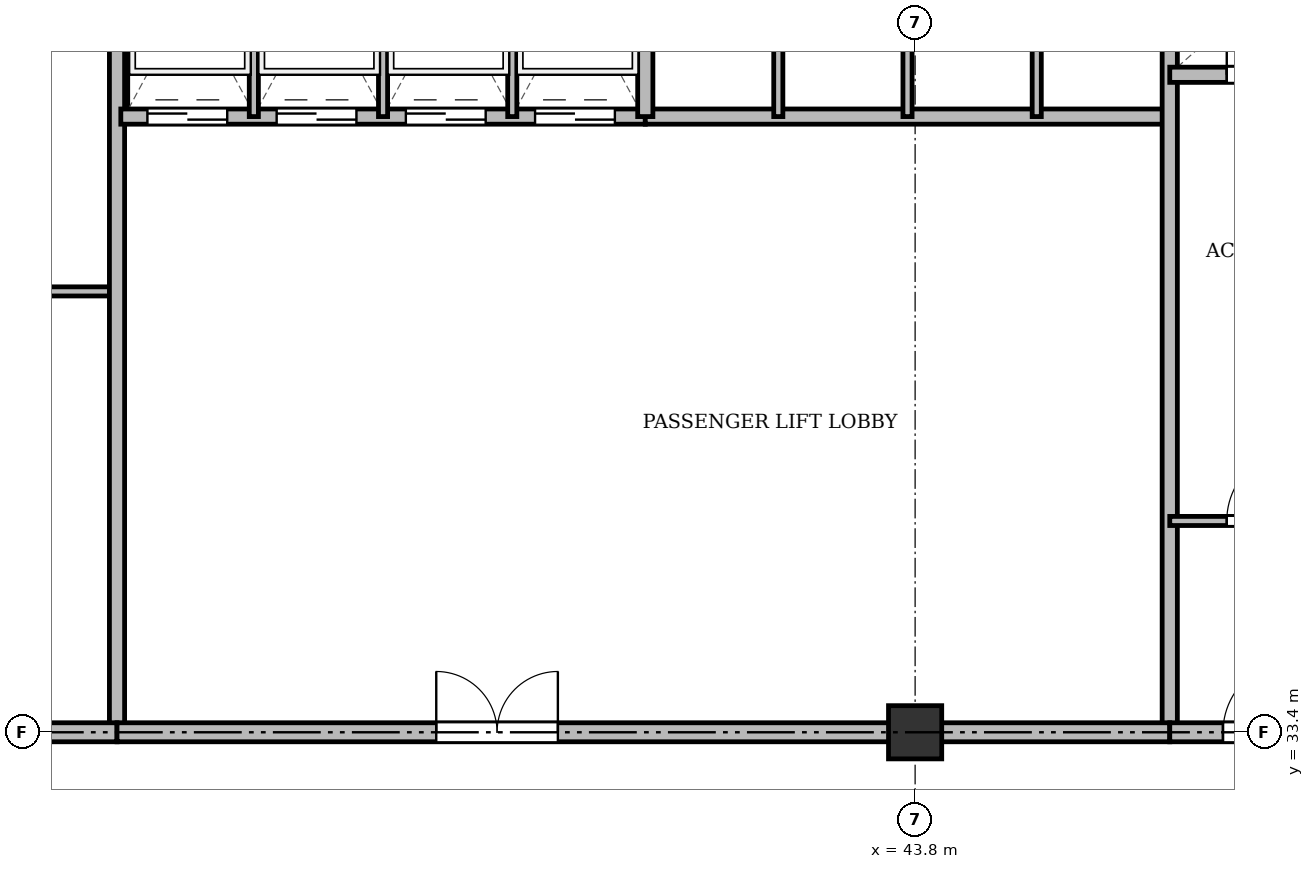
"""IFC4 building model, lengths in metres.
Left out: names, types, materials, properties, quantities, classifications, styles, units other than length and angle.
Written with IfcOpenShell. Run it as: python <this file> out.ifc"""

import sys

from ifc_helpers import new_model, si_unit, direction, frame, frame_2d, origin, origin_2d, place, context, subcontext, project, spatial, rectangle, extrude, source, transform, mapped, element, fill, save


model = new_model("IFC4")
c1 = context("Model", 3, precision=1e-05, world=origin(), true_north=direction((0.0, 1.0)))
c2 = subcontext(c1, "Body", "Model", "MODEL_VIEW")
j1 = project(units=[si_unit("LENGTHUNIT", "METRE"), si_unit("PLANEANGLEUNIT", "RADIAN")], contexts=[c1])
p1 = place(None, origin())
s1 = spatial("IfcSite", under=j1, at=p1, CompositionType="ELEMENT")
p2 = place(p1, origin())
s2 = spatial("IfcBuilding", under=s1, at=p2, CompositionType="ELEMENT")
p3 = place(p2, frame((0.0, 0.0, 171.7)))
s3 = spatial("IfcBuildingStorey", under=s2, at=p3, CompositionType="ELEMENT", Elevation=171.7)
m1 = source(origin(), c2, "Body", "SweptSolid", [
    extrude(rectangle(XDim=0.7, YDim=0.7, at=origin_2d()), origin(), (0.0, 0.0, 1.0), 3.6),
])
p4 = place(p3, frame((43.8, 33.4, 0.0), z_axis=(0.0, 0.0, 1.0), x_axis=(1.0, 0.0, 0.0)))
e1 = element("IfcColumn", 1, at=p4, inside=s3, PredefinedType="COLUMN", context=c2, shape_type="MappedRepresentation", body=[
    mapped(m1, transform((0.0, 0.0, 0.0), x_axis=(1.0, 0.0, 0.0), y_axis=(0.0, 1.0, 0.0), z_axis=(0.0, 0.0, 1.0), scale=1.0)),
])
p5 = place(p3, frame((26.3, 39.2, 0.0), z_axis=(0.0, 0.0, 1.0), x_axis=(1.0, 0.0, 0.0)))
e2 = element("IfcWall", 2, at=p5, inside=s3, PredefinedType="PARTITIONING", context=c2, shape_type="SweptSolid", body=[
    extrude(rectangle(XDim=7.0, YDim=0.12, at=frame_2d((3.5, 0.0))), origin(), (0.0, 0.0, 1.0), 2.85),
])
p6 = place(p5, frame((2.6, 0.0, 0.0)))
e3 = element("IfcOpeningElement", 3, at=p6, cuts=e2, PredefinedType="OPENING", context=c2, shape_type="SweptSolid", body=[
    extrude(rectangle(XDim=0.95, YDim=2.15, at=frame_2d((0.475, 1.075))), frame((0.0, 0.07, 0.0), z_axis=(0.0, -1.0, 0.0), x_axis=(1.0, 0.0, 0.0)), (0.0, 0.0, 1.0), 0.14),
])
p7 = place(p3, frame((33.3, 33.4, 0.0), z_axis=(0.0, 0.0, 1.0), x_axis=(0.0, 1.0, 0.0)))
e4 = element("IfcWall", 4, at=p7, inside=s3, PredefinedType="SOLIDWALL", context=c2, shape_type="SweptSolid", body=[
    extrude(rectangle(XDim=11.3, YDim=0.2, at=frame_2d((5.65, 0.0))), origin(), (0.0, 0.0, 1.0), 2.75),
])
p8 = place(p3, frame((33.35, 41.5, 0.0), z_axis=(0.0, 0.0, 1.0), x_axis=(1.0, 0.0, 0.0)))
e5 = element("IfcWall", 5, at=p8, inside=s3, PredefinedType="SOLIDWALL", context=c2, shape_type="SweptSolid", body=[
    extrude(rectangle(XDim=6.9, YDim=0.2, at=frame_2d((3.45, 0.0))), origin(), (0.0, 0.0, 1.0), 3.35),
])
p9 = place(p8, frame((0.35, 0.0, 0.0)))
e6 = element("IfcOpeningElement", 6, at=p9, cuts=e5, PredefinedType="OPENING", context=c2, shape_type="SweptSolid", body=[
    extrude(rectangle(XDim=1.05, YDim=2.15, at=frame_2d((0.525, 1.075))), frame((0.0, 0.11, 0.0), z_axis=(0.0, -1.0, 0.0), x_axis=(1.0, 0.0, 0.0)), (0.0, 0.0, 1.0), 0.22),
])
p10 = place(p8, frame((2.05, 0.0, 0.0)))
e7 = element("IfcOpeningElement", 7, at=p10, cuts=e5, PredefinedType="OPENING", context=c2, shape_type="SweptSolid", body=[
    extrude(rectangle(XDim=1.05, YDim=2.15, at=frame_2d((0.525, 1.075))), frame((0.0, 0.11, 0.0), z_axis=(0.0, -1.0, 0.0), x_axis=(1.0, 0.0, 0.0)), (0.0, 0.0, 1.0), 0.22),
])
p11 = place(p8, frame((3.75, 0.0, 0.0)))
e8 = element("IfcOpeningElement", 8, at=p11, cuts=e5, PredefinedType="OPENING", context=c2, shape_type="SweptSolid", body=[
    extrude(rectangle(XDim=1.05, YDim=2.15, at=frame_2d((0.525, 1.075))), frame((0.0, 0.11, 0.0), z_axis=(0.0, -1.0, 0.0), x_axis=(1.0, 0.0, 0.0)), (0.0, 0.0, 1.0), 0.22),
])
p12 = place(p8, frame((5.45, 0.0, 0.0)))
e9 = element("IfcOpeningElement", 9, at=p12, cuts=e5, PredefinedType="OPENING", context=c2, shape_type="SweptSolid", body=[
    extrude(rectangle(XDim=1.05, YDim=2.15, at=frame_2d((0.525, 1.075))), frame((0.0, 0.11, 0.0), z_axis=(0.0, -1.0, 0.0), x_axis=(1.0, 0.0, 0.0)), (0.0, 0.0, 1.0), 0.22),
])
for number, where, z_axis, x_axis in (
    (10, (35.1, 41.5, 0.0), (0.0, 0.0, 1.0), (0.0, 1.0, 0.0)),
    (11, (36.8, 41.5, 0.0), (0.0, 0.0, 1.0), (0.0, 1.0, 0.0)),
    (12, (38.5, 41.5, 0.0), (0.0, 0.0, 1.0), (0.0, 1.0, 0.0)),
):
    element("IfcWall", number, at=place(p3, frame(where, z_axis=z_axis, x_axis=x_axis)), inside=s3, PredefinedType="PARTITIONING", context=c2, shape_type="SweptSolid", body=[
        extrude(rectangle(XDim=3.2, YDim=0.12, at=frame_2d((1.6, 0.0))), origin(), (0.0, 0.0, 1.0), 3.35),
    ])
p13 = place(p3, frame((40.25, 41.5, 0.0), z_axis=(0.0, 0.0, 1.0), x_axis=(1.0, 0.0, 0.0)))
e13 = element("IfcWall", 13, at=p13, inside=s3, PredefinedType="SOLIDWALL", context=c2, shape_type="SweptSolid", body=[
    extrude(rectangle(XDim=6.9, YDim=0.2, at=frame_2d((3.45, 0.0))), origin(), (0.0, 0.0, 1.0), 2.85),
])
p14 = place(p3, frame((40.25, 41.5, 0.0), z_axis=(0.0, 0.0, 1.0), x_axis=(0.0, 1.0, 0.0)))
e14 = element("IfcWall", 14, at=p14, inside=s3, PredefinedType="SOLIDWALL", context=c2, shape_type="SweptSolid", body=[
    extrude(rectangle(XDim=3.2, YDim=0.2, at=frame_2d((1.6, 0.0))), origin(), (0.0, 0.0, 1.0), 3.35),
])
p15 = place(p3, frame((42.0, 41.5, 0.0), z_axis=(0.0, 0.0, 1.0), x_axis=(0.0, 1.0, 0.0)))
e15 = element("IfcWall", 15, at=p15, inside=s3, PredefinedType="PARTITIONING", context=c2, shape_type="SweptSolid", body=[
    extrude(rectangle(XDim=3.2, YDim=0.12, at=frame_2d((1.6, 0.0))), origin(), (0.0, 0.0, 1.0), 3.35),
])
p16 = place(p3, frame((43.7, 41.5, 0.0), z_axis=(0.0, 0.0, 1.0), x_axis=(0.0, 1.0, 0.0)))
e16 = element("IfcWall", 16, at=p16, inside=s3, PredefinedType="PARTITIONING", context=c2, shape_type="SweptSolid", body=[
    extrude(rectangle(XDim=3.2, YDim=0.12, at=frame_2d((1.6, 0.0))), origin(), (0.0, 0.0, 1.0), 2.85),
])
p17 = place(p3, frame((45.4, 41.5, 0.0), z_axis=(0.0, 0.0, 1.0), x_axis=(0.0, 1.0, 0.0)))
e17 = element("IfcWall", 17, at=p17, inside=s3, PredefinedType="PARTITIONING", context=c2, shape_type="SweptSolid", body=[
    extrude(rectangle(XDim=3.2, YDim=0.12, at=frame_2d((1.6, 0.0))), origin(), (0.0, 0.0, 1.0), 3.35),
])
p18 = place(p3, frame((47.15, 33.4, 0.0), z_axis=(0.0, 0.0, 1.0), x_axis=(0.0, 1.0, 0.0)))
e18 = element("IfcWall", 18, at=p18, inside=s3, PredefinedType="SOLIDWALL", context=c2, shape_type="SweptSolid", body=[
    extrude(rectangle(XDim=11.3, YDim=0.2, at=frame_2d((5.65, 0.0))), origin(), (0.0, 0.0, 1.0), 2.75),
])
p19 = place(p3, frame((26.3, 33.4, 0.0), z_axis=(0.0, 0.0, 1.0), x_axis=(1.0, 0.0, 0.0)))
e19 = element("IfcWall", 19, at=p19, inside=s3, PredefinedType="PARTITIONING", context=c2, shape_type="SweptSolid", body=[
    extrude(rectangle(XDim=7.0, YDim=0.25, at=frame_2d((3.5, 0.0))), origin(), (0.0, 0.0, 1.0), 2.75),
])
p20 = place(p19, frame((1.35, 0.0, 0.0)))
e20 = element("IfcOpeningElement", 20, at=p20, cuts=e19, PredefinedType="OPENING", context=c2, shape_type="SweptSolid", body=[
    extrude(rectangle(XDim=0.95, YDim=2.15, at=frame_2d((0.475, 1.075))), frame((0.0, 0.135, 0.0), z_axis=(0.0, -1.0, 0.0), x_axis=(1.0, 0.0, 0.0)), (0.0, 0.0, 1.0), 0.27),
])
p21 = place(p3, frame((33.3, 33.4, 0.0), z_axis=(0.0, 0.0, 1.0), x_axis=(1.0, 0.0, 0.0)))
e21 = element("IfcWall", 21, at=p21, inside=s3, PredefinedType="PARTITIONING", context=c2, shape_type="SweptSolid", body=[
    extrude(rectangle(XDim=13.85, YDim=0.25, at=frame_2d((6.925, 0.0))), origin(), (0.0, 0.0, 1.0), 2.75),
])
p22 = place(p21, frame((4.2, 0.0, 0.0)))
e22 = element("IfcOpeningElement", 22, at=p22, cuts=e21, PredefinedType="OPENING", context=c2, shape_type="SweptSolid", body=[
    extrude(rectangle(XDim=1.6, YDim=2.2, at=frame_2d((0.8, 1.1))), frame((0.0, 0.135, 0.0), z_axis=(0.0, -1.0, 0.0), x_axis=(1.0, 0.0, 0.0)), (0.0, 0.0, 1.0), 0.27),
])
p23 = place(p3, frame((47.15, 42.05, 0.0), z_axis=(0.0, 0.0, 1.0), x_axis=(1.0, 0.0, 0.0)))
e23 = element("IfcWall", 23, at=p23, inside=s3, PredefinedType="SOLIDWALL", context=c2, shape_type="SweptSolid", body=[
    extrude(rectangle(XDim=7.85, YDim=0.2, at=frame_2d((3.925, 0.0))), origin(), (0.0, 0.0, 1.0), 2.85),
])
p24 = place(p23, frame((0.75, 0.0, 0.0)))
e24 = element("IfcOpeningElement", 24, at=p24, cuts=e23, PredefinedType="OPENING", context=c2, shape_type="SweptSolid", body=[
    extrude(rectangle(XDim=0.9, YDim=2.1, at=frame_2d((0.45, 1.05))), frame((0.0, 0.11, 0.0), z_axis=(0.0, -1.0, 0.0), x_axis=(1.0, 0.0, 0.0)), (0.0, 0.0, 1.0), 0.22),
])
p25 = place(p23, frame((3.85, 0.0, 0.0)))
e25 = element("IfcOpeningElement", 25, at=p25, cuts=e23, PredefinedType="OPENING", context=c2, shape_type="SweptSolid", body=[
    extrude(rectangle(XDim=0.9, YDim=2.1, at=frame_2d((0.45, 1.05))), frame((0.0, 0.11, 0.0), z_axis=(0.0, -1.0, 0.0), x_axis=(1.0, 0.0, 0.0)), (0.0, 0.0, 1.0), 0.22),
])
p26 = place(p3, frame((47.15, 36.18, 0.0), z_axis=(0.0, 0.0, 1.0), x_axis=(1.0, 0.0, 0.0)))
e26 = element("IfcWall", 26, at=p26, inside=s3, PredefinedType="PARTITIONING", context=c2, shape_type="SweptSolid", body=[
    extrude(rectangle(XDim=5.3, YDim=0.12, at=frame_2d((2.65, 0.0))), origin(), (0.0, 0.0, 1.0), 2.85),
])
p27 = place(p26, frame((0.75, 0.0, 0.0)))
e27 = element("IfcOpeningElement", 27, at=p27, cuts=e26, PredefinedType="OPENING", context=c2, shape_type="SweptSolid", body=[
    extrude(rectangle(XDim=0.95, YDim=2.15, at=frame_2d((0.475, 1.075))), frame((0.0, 0.07, 0.0), z_axis=(0.0, -1.0, 0.0), x_axis=(1.0, 0.0, 0.0)), (0.0, 0.0, 1.0), 0.14),
])
p28 = place(p26, frame((3.45, 0.0, 0.0)))
e28 = element("IfcOpeningElement", 28, at=p28, cuts=e26, PredefinedType="OPENING", context=c2, shape_type="SweptSolid", body=[
    extrude(rectangle(XDim=0.95, YDim=2.15, at=frame_2d((0.475, 1.075))), frame((0.0, 0.07, 0.0), z_axis=(0.0, -1.0, 0.0), x_axis=(1.0, 0.0, 0.0)), (0.0, 0.0, 1.0), 0.14),
])
p29 = place(p3, frame((47.15, 33.4, 0.0), z_axis=(0.0, 0.0, 1.0), x_axis=(1.0, 0.0, 0.0)))
e29 = element("IfcWall", 29, at=p29, inside=s3, PredefinedType="PARTITIONING", context=c2, shape_type="SweptSolid", body=[
    extrude(rectangle(XDim=11.15, YDim=0.25, at=frame_2d((5.575, 0.0))), origin(), (0.0, 0.0, 1.0), 2.75),
])
p30 = place(p29, frame((0.7, 0.0, 0.0)))
e30 = element("IfcOpeningElement", 30, at=p30, cuts=e29, PredefinedType="OPENING", context=c2, shape_type="SweptSolid", body=[
    extrude(rectangle(XDim=0.95, YDim=2.15, at=frame_2d((0.475, 1.075))), frame((0.0, 0.135, 0.0), z_axis=(0.0, -1.0, 0.0), x_axis=(1.0, 0.0, 0.0)), (0.0, 0.0, 1.0), 0.27),
])
p31 = place(p29, frame((6.0, 0.0, 0.0)))
e31 = element("IfcOpeningElement", 31, at=p31, cuts=e29, PredefinedType="OPENING", context=c2, shape_type="SweptSolid", body=[
    extrude(rectangle(XDim=1.2, YDim=2.15, at=frame_2d((0.6, 1.075))), frame((0.0, 0.135, 0.0), z_axis=(0.0, -1.0, 0.0), x_axis=(1.0, 0.0, 0.0)), (0.0, 0.0, 1.0), 0.27),
])
m2 = source(origin(), c2, "Body", "SweptSolid", [
    extrude(rectangle(XDim=1.05, YDim=2.15, at=frame_2d((0.525, 1.075))), frame((0.0, 0.025, 0.0), z_axis=(0.0, -1.0, 0.0), x_axis=(1.0, 0.0, 0.0)), (0.0, 0.0, 1.0), 0.05),
])
p32 = place(p9, origin())
e32 = element("IfcDoor", 32, at=p32, inside=s3, OperationType="DOUBLE_DOOR_SLIDING", PredefinedType="DOOR", context=c2, shape_type="MappedRepresentation", body=[
    mapped(m2, transform((0.0, 0.0, 0.0), x_axis=(1.0, 0.0, 0.0), y_axis=(0.0, 1.0, 0.0), z_axis=(0.0, 0.0, 1.0), scale=1.0)),
])
fill(e6, e32)
p33 = place(p10, origin())
e33 = element("IfcDoor", 33, at=p33, inside=s3, OperationType="DOUBLE_DOOR_SLIDING", PredefinedType="DOOR", context=c2, shape_type="MappedRepresentation", body=[
    mapped(m2, transform((0.0, 0.0, 0.0), x_axis=(1.0, 0.0, 0.0), y_axis=(0.0, 1.0, 0.0), z_axis=(0.0, 0.0, 1.0), scale=1.0)),
])
fill(e7, e33)
p34 = place(p11, origin())
e34 = element("IfcDoor", 34, at=p34, inside=s3, OperationType="DOUBLE_DOOR_SLIDING", PredefinedType="DOOR", context=c2, shape_type="MappedRepresentation", body=[
    mapped(m2, transform((0.0, 0.0, 0.0), x_axis=(1.0, 0.0, 0.0), y_axis=(0.0, 1.0, 0.0), z_axis=(0.0, 0.0, 1.0), scale=1.0)),
])
fill(e8, e34)
p35 = place(p12, origin())
e35 = element("IfcDoor", 35, at=p35, inside=s3, OperationType="DOUBLE_DOOR_SLIDING", PredefinedType="DOOR", context=c2, shape_type="MappedRepresentation", body=[
    mapped(m2, transform((0.0, 0.0, 0.0), x_axis=(1.0, 0.0, 0.0), y_axis=(0.0, 1.0, 0.0), z_axis=(0.0, 0.0, 1.0), scale=1.0)),
])
fill(e9, e35)
m3 = source(origin(), c2, "Body", "SweptSolid", [
    extrude(rectangle(XDim=1.6, YDim=2.2, at=frame_2d((0.8, 1.1))), frame((0.0, 0.025, 0.0), z_axis=(0.0, -1.0, 0.0), x_axis=(1.0, 0.0, 0.0)), (0.0, 0.0, 1.0), 0.05),
])
p36 = place(p22, origin())
e36 = element("IfcDoor", 36, at=p36, inside=s3, OperationType="DOUBLE_DOOR_SINGLE_SWING", PredefinedType="DOOR", context=c2, shape_type="MappedRepresentation", body=[
    mapped(m3, transform((0.0, 0.0, 0.0), x_axis=(1.0, 0.0, 0.0), y_axis=(0.0, 1.0, 0.0), z_axis=(0.0, 0.0, 1.0), scale=1.0)),
])
fill(e22, e36)
m4 = source(origin(), c2, "Body", "SweptSolid", [
    extrude(rectangle(XDim=0.9, YDim=2.1, at=frame_2d((0.45, 1.05))), frame((0.0, 0.025, 0.0), z_axis=(0.0, -1.0, 0.0), x_axis=(1.0, 0.0, 0.0)), (0.0, 0.0, 1.0), 0.05),
])
p37 = place(p24, origin())
e37 = element("IfcDoor", 37, at=p37, inside=s3, OperationType="SINGLE_SWING_LEFT", PredefinedType="DOOR", context=c2, shape_type="MappedRepresentation", body=[
    mapped(m4, transform((0.0, 0.0, 0.0), x_axis=(1.0, 0.0, 0.0), y_axis=(0.0, 1.0, 0.0), z_axis=(0.0, 0.0, 1.0), scale=1.0)),
])
fill(e24, e37)
m5 = source(origin(), c2, "Body", "SweptSolid", [
    extrude(rectangle(XDim=0.95, YDim=2.15, at=frame_2d((0.475, 1.075))), frame((0.0, 0.025, 0.0), z_axis=(0.0, -1.0, 0.0), x_axis=(1.0, 0.0, 0.0)), (0.0, 0.0, 1.0), 0.05),
])
p38 = place(p27, origin())
e38 = element("IfcDoor", 38, at=p38, inside=s3, OperationType="SINGLE_SWING_RIGHT", PredefinedType="DOOR", context=c2, shape_type="MappedRepresentation", body=[
    mapped(m5, transform((0.0, 0.0, 0.0), x_axis=(1.0, 0.0, 0.0), y_axis=(0.0, 1.0, 0.0), z_axis=(0.0, 0.0, 1.0), scale=1.0)),
])
fill(e27, e38)
p39 = place(p30, origin())
e39 = element("IfcDoor", 39, at=p39, inside=s3, OperationType="SINGLE_SWING_RIGHT", PredefinedType="DOOR", context=c2, shape_type="MappedRepresentation", body=[
    mapped(m5, transform((0.0, 0.0, 0.0), x_axis=(1.0, 0.0, 0.0), y_axis=(0.0, 1.0, 0.0), z_axis=(0.0, 0.0, 1.0), scale=1.0)),
])
fill(e30, e39)
save(model, sys.argv[1])
